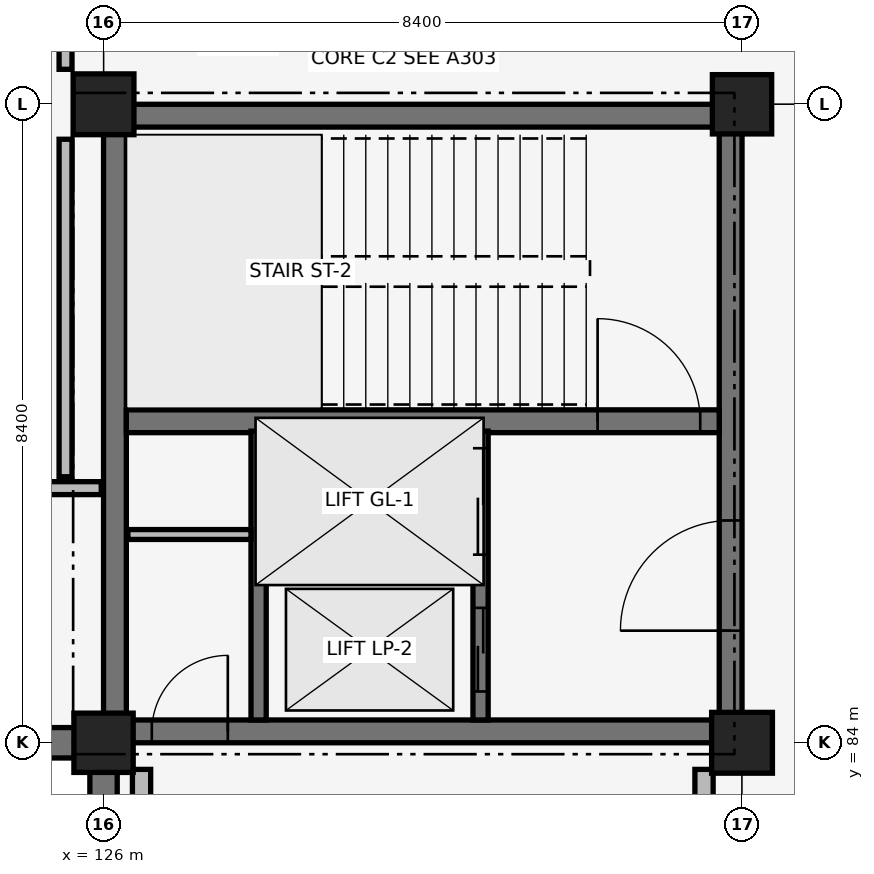
"""IFC4 building model, lengths in metres.
Left out: names, types, materials, properties, quantities, classifications, styles, units other than length and angle.
Written with IfcOpenShell. Run it as: python <this file> out.ifc"""

import sys

from ifc_helpers import new_model, si_unit, direction, frame, frame_2d, origin, origin_2d, place, context, subcontext, project, spatial, rectangle, extrude, element, fill, save


model = new_model("IFC4")
c1 = context("Model", 3, precision=1e-05, world=origin(), true_north=direction((0.0, 1.0)))
c2 = subcontext(c1, "Body", "Model", "MODEL_VIEW")
j1 = project(units=[si_unit("LENGTHUNIT", "METRE"), si_unit("PLANEANGLEUNIT", "RADIAN")], contexts=[c1])
p1 = place(None, origin())
s1 = spatial("IfcSite", under=j1, at=p1, CompositionType="ELEMENT")
p2 = place(p1, origin())
s2 = spatial("IfcBuilding", under=s1, at=p2, CompositionType="ELEMENT")
p3 = place(p2, frame((0.0, 0.0, -4.42)))
s3 = spatial("IfcBuildingStorey", under=s2, at=p3, CompositionType="ELEMENT", Elevation=-4.42)
p4 = place(p3, frame((117.95, 84.0, 0.0), z_axis=(0.0, 0.0, 1.0), x_axis=(1.0, 0.0, 0.0)))
e1 = element("IfcWall", 1, at=p4, inside=s3, PredefinedType="USERDEFINED", context=c2, shape_type="SweptSolid", body=[
    extrude(rectangle(XDim=7.7, YDim=0.4, at=frame_2d((3.85, 0.0))), origin(), (0.0, 0.0, 1.0), 4.12),
])
p5 = place(p3, frame((126.0, 75.95, 0.0), z_axis=(0.0, 0.0, 1.0), x_axis=(0.0, 1.0, 0.0)))
e2 = element("IfcWall", 2, at=p5, inside=s3, PredefinedType="USERDEFINED", context=c2, shape_type="SweptSolid", body=[
    extrude(rectangle(XDim=7.7, YDim=0.36, at=frame_2d((3.85, 0.0))), origin(), (0.0, 0.0, 1.0), 4.12),
])
p6 = place(p3, frame((126.15, 84.15, 0.0), z_axis=(0.0, 0.0, 1.0), x_axis=(1.0, 0.0, 0.0)))
e3 = element("IfcWall", 3, at=p6, inside=s3, PredefinedType="SHEAR", context=c2, shape_type="SweptSolid", body=[
    extrude(rectangle(XDim=8.1, YDim=0.3, at=frame_2d((4.05, 0.0))), origin(), (0.0, 0.0, 1.0), 4.12),
])
p7 = place(p6, frame((0.485, 0.0, 0.0)))
e4 = element("IfcOpeningElement", 4, at=p7, cuts=e3, PredefinedType="OPENING", context=c2, shape_type="SweptSolid", body=[
    extrude(rectangle(XDim=1.0, YDim=2.15, at=frame_2d((0.5, 1.075))), frame((0.0, 0.16, 0.0), z_axis=(0.0, -1.0, 0.0), x_axis=(1.0, 0.0, 0.0)), (0.0, 0.0, 1.0), 0.32),
])
for number, where, z_axis, x_axis in (
    (5, (126.15, 92.25, 0.0), (0.0, 0.0, 1.0), (1.0, 0.0, 0.0)),
    (6, (126.15, 84.15, 0.0), (0.0, 0.0, 1.0), (0.0, 1.0, 0.0)),
):
    element("IfcWall", number, at=place(p3, frame(where, z_axis=z_axis, x_axis=x_axis)), inside=s3, PredefinedType="SHEAR", context=c2, shape_type="SweptSolid", body=[
        extrude(rectangle(XDim=8.1, YDim=0.3, at=frame_2d((4.05, 0.0))), origin(), (0.0, 0.0, 1.0), 4.12),
    ])
p8 = place(p3, frame((134.25, 84.15, 0.0), z_axis=(0.0, 0.0, 1.0), x_axis=(0.0, 1.0, 0.0)))
e7 = element("IfcWall", 7, at=p8, inside=s3, PredefinedType="SHEAR", context=c2, shape_type="SweptSolid", body=[
    extrude(rectangle(XDim=8.1, YDim=0.3, at=frame_2d((4.05, 0.0))), origin(), (0.0, 0.0, 1.0), 4.12),
])
p9 = place(p8, frame((1.325, 0.0, 0.0)))
e8 = element("IfcOpeningElement", 8, at=p9, cuts=e7, PredefinedType="OPENING", context=c2, shape_type="SweptSolid", body=[
    extrude(rectangle(XDim=1.45, YDim=2.15, at=frame_2d((0.725, 1.075))), frame((0.0, 0.16, 0.0), z_axis=(0.0, -1.0, 0.0), x_axis=(1.0, 0.0, 0.0)), (0.0, 0.0, 1.0), 0.32),
])
p10 = place(p3, frame((126.3, 88.23, 0.0), z_axis=(0.0, 0.0, 1.0), x_axis=(1.0, 0.0, 0.0)))
e9 = element("IfcWall", 9, at=p10, inside=s3, PredefinedType="SHEAR", context=c2, shape_type="SweptSolid", body=[
    extrude(rectangle(XDim=7.8, YDim=0.3, at=frame_2d((3.9, 0.0))), origin(), (0.0, 0.0, 1.0), 4.12),
])
p11 = place(p10, frame((6.2, 0.0, 0.0)))
e10 = element("IfcOpeningElement", 10, at=p11, cuts=e9, PredefinedType="OPENING", context=c2, shape_type="SweptSolid", body=[
    extrude(rectangle(XDim=1.35, YDim=2.15, at=frame_2d((0.675, 1.075))), frame((0.0, 0.16, 0.0), z_axis=(0.0, -1.0, 0.0), x_axis=(1.0, 0.0, 0.0)), (0.0, 0.0, 1.0), 0.32),
])
p12 = place(p3, frame((126.0, 84.0, -0.4), z_axis=(0.0, 0.0, 1.0), x_axis=(1.0, 0.0, 0.0)))
e11 = element("IfcColumn", 11, at=p12, inside=s3, PredefinedType="COLUMN", context=c2, shape_type="SweptSolid", body=[
    extrude(rectangle(XDim=0.78, YDim=0.78, at=origin_2d()), origin(), (0.0, 0.0, 1.0), 4.52),
])
for number, where, z_axis, x_axis in (
    (12, (126.0, 92.4, -0.4), (0.0, 0.0, 1.0), (1.0, 0.0, 0.0)),
    (13, (134.4, 84.0, -0.4), (0.0, 0.0, 1.0), (1.0, 0.0, 0.0)),
):
    element("IfcColumn", number, at=place(p3, frame(where, z_axis=z_axis, x_axis=x_axis)), inside=s3, PredefinedType="COLUMN", context=c2, shape_type="SweptSolid", body=[
        extrude(rectangle(XDim=0.8, YDim=0.8, at=origin_2d()), origin(), (0.0, 0.0, 1.0), 4.52),
    ])
p13 = place(p3, frame((134.4, 92.4, -0.4), z_axis=(0.0, 0.0, 1.0), x_axis=(1.0, 0.0, 0.0)))
e14 = element("IfcColumn", 14, at=p13, inside=s3, PredefinedType="COLUMN", context=c2, shape_type="SweptSolid", body=[
    extrude(rectangle(XDim=0.78, YDim=0.78, at=origin_2d()), origin(), (0.0, 0.0, 1.0), 4.52),
])
p14 = place(p3, frame((130.96, 84.3, 0.0), z_axis=(0.0, 0.0, 1.0), x_axis=(0.0, 1.0, 0.0)))
e15 = element("IfcWall", 15, at=p14, inside=s3, PredefinedType="SHEAR", context=c2, shape_type="SweptSolid", body=[
    extrude(rectangle(XDim=3.8, YDim=0.2, at=frame_2d((1.9, 0.0))), origin(), (0.0, 0.0, 1.0), 3.17),
])
p15 = place(p14, frame((0.375, 0.0, 0.0)))
e16 = element("IfcOpeningElement", 16, at=p15, cuts=e15, PredefinedType="OPENING", context=c2, shape_type="SweptSolid", body=[
    extrude(rectangle(XDim=1.1, YDim=2.15, at=frame_2d((0.55, 1.075))), frame((0.0, 0.11, 0.0), z_axis=(0.0, -1.0, 0.0), x_axis=(1.0, 0.0, 0.0)), (0.0, 0.0, 1.0), 0.22),
])
p16 = place(p14, frame((2.175, 0.0, 0.0)))
e17 = element("IfcOpeningElement", 17, at=p16, cuts=e15, PredefinedType="OPENING", context=c2, shape_type="SweptSolid", body=[
    extrude(rectangle(XDim=1.4, YDim=2.2, at=frame_2d((0.7, 1.1))), frame((0.0, 0.11, 0.0), z_axis=(0.0, -1.0, 0.0), x_axis=(1.0, 0.0, 0.0)), (0.0, 0.0, 1.0), 0.22),
])
p17 = place(p3, frame((128.04, 84.3, 0.0), z_axis=(0.0, 0.0, 1.0), x_axis=(0.0, 1.0, 0.0)))
e18 = element("IfcWall", 18, at=p17, inside=s3, PredefinedType="SHEAR", context=c2, shape_type="SweptSolid", body=[
    extrude(rectangle(XDim=3.8, YDim=0.2, at=frame_2d((1.9, 0.0))), origin(), (0.0, 0.0, 1.0), 3.17),
])
p18 = place(p3, frame((128.15, 86.2, 0.0), z_axis=(0.0, 0.0, 1.0), x_axis=(1.0, 0.0, 0.0)))
e19 = element("IfcWall", 19, at=p18, inside=s3, PredefinedType="SHEAR", context=c2, shape_type="SweptSolid", body=[
    extrude(rectangle(XDim=2.7, YDim=0.18, at=frame_2d((1.35, 0.0))), origin(), (0.0, 0.0, 1.0), 4.12),
])
p19 = place(p3, frame((126.32, 86.74, 0.0), z_axis=(0.0, 0.0, 1.0), x_axis=(1.0, 0.0, 0.0)))
e20 = element("IfcWall", 20, at=p19, inside=s3, PredefinedType="PARTITIONING", context=c2, shape_type="SweptSolid", body=[
    extrude(rectangle(XDim=1.62, YDim=0.13, at=frame_2d((0.81, 0.0))), origin(), (0.0, 0.0, 1.0), 4.12),
])
p20 = place(p3, frame((133.9, 76.05, 0.0), z_axis=(0.0, 0.0, 1.0), x_axis=(0.0, 1.0, 0.0)))
e21 = element("IfcWall", 21, at=p20, inside=s3, PredefinedType="PARTITIONING", context=c2, shape_type="SweptSolid", body=[
    extrude(rectangle(XDim=7.6, YDim=0.24, at=frame_2d((3.8, 0.0))), origin(), (0.0, 0.0, 1.0), 3.17),
])
p21 = place(p3, frame((126.5, 76.06, 0.0), z_axis=(0.0, 0.0, 1.0), x_axis=(0.0, 1.0, 0.0)))
e22 = element("IfcWall", 22, at=p21, inside=s3, PredefinedType="PARTITIONING", context=c2, shape_type="SweptSolid", body=[
    extrude(rectangle(XDim=7.59, YDim=0.24, at=frame_2d((3.795, 0.0))), origin(), (0.0, 0.0, 1.0), 3.17),
])
p22 = place(p3, frame((109.23, 87.35, 0.0), z_axis=(0.0, 0.0, 1.0), x_axis=(1.0, 0.0, 0.0)))
e23 = element("IfcWall", 23, at=p22, inside=s3, PredefinedType="PARTITIONING", context=c2, shape_type="SweptSolid", body=[
    extrude(rectangle(XDim=16.74, YDim=0.17, at=frame_2d((8.37, 0.0))), origin(), (0.0, 0.0, 1.0), 3.32),
])
p23 = place(p22, frame((7.82, 0.0, 0.0)))
e24 = element("IfcOpeningElement", 24, at=p23, cuts=e23, PredefinedType="OPENING", context=c2, shape_type="SweptSolid", body=[
    extrude(rectangle(XDim=1.1, YDim=2.15, at=frame_2d((0.55, 1.075))), frame((0.0, 0.095, 0.0), z_axis=(0.0, -1.0, 0.0), x_axis=(1.0, 0.0, 0.0)), (0.0, 0.0, 1.0), 0.19),
])
p24 = place(p3, frame((125.5, 87.5, 0.0), z_axis=(0.0, 0.0, 1.0), x_axis=(0.0, 1.0, 0.0)))
e25 = element("IfcWall", 25, at=p24, inside=s3, PredefinedType="PARTITIONING", context=c2, shape_type="SweptSolid", body=[
    extrude(rectangle(XDim=4.44, YDim=0.17, at=frame_2d((2.22, 0.0))), origin(), (0.0, 0.0, 1.0), 3.57),
])
p25 = place(p3, frame((125.5, 92.86, 0.0), z_axis=(0.0, 0.0, 1.0), x_axis=(0.0, 1.0, 0.0)))
e26 = element("IfcWall", 26, at=p25, inside=s3, PredefinedType="PARTITIONING", context=c2, shape_type="SweptSolid", body=[
    extrude(rectangle(XDim=7.49, YDim=0.17, at=frame_2d((3.745, 0.0))), origin(), (0.0, 0.0, 1.0), 3.56),
])
p26 = place(p11, origin())
e27 = element("IfcDoor", 27, at=p26, inside=s3, OperationType="SINGLE_SWING_LEFT", PredefinedType="DOOR", context=c2, shape_type="SweptSolid", body=[
    extrude(rectangle(XDim=1.35, YDim=2.15, at=frame_2d((0.675, 1.075))), frame((0.0, 0.025, 0.0), z_axis=(0.0, -1.0, 0.0), x_axis=(1.0, 0.0, 0.0)), (0.0, 0.0, 1.0), 0.05),
])
fill(e10, e27)
p27 = place(p15, origin())
e28 = element("IfcDoor", 28, at=p27, inside=s3, OperationType="SLIDING_TO_LEFT", PredefinedType="DOOR", context=c2, shape_type="SweptSolid", body=[
    extrude(rectangle(XDim=1.1, YDim=2.15, at=frame_2d((0.55, 1.075))), frame((0.0, 0.025, 0.0), z_axis=(0.0, -1.0, 0.0), x_axis=(1.0, 0.0, 0.0)), (0.0, 0.0, 1.0), 0.05),
])
fill(e16, e28)
p28 = place(p16, origin())
e29 = element("IfcDoor", 29, at=p28, inside=s3, OperationType="SLIDING_TO_LEFT", PredefinedType="DOOR", context=c2, shape_type="SweptSolid", body=[
    extrude(rectangle(XDim=1.4, YDim=2.2, at=frame_2d((0.7, 1.1))), frame((0.0, 0.025, 0.0), z_axis=(0.0, -1.0, 0.0), x_axis=(1.0, 0.0, 0.0)), (0.0, 0.0, 1.0), 0.05),
])
fill(e17, e29)
p29 = place(p9, origin())
e30 = element("IfcDoor", 30, at=p29, inside=s3, OperationType="DOUBLE_DOOR_SINGLE_SWING", PredefinedType="DOOR", context=c2, shape_type="SweptSolid", body=[
    extrude(rectangle(XDim=1.45, YDim=2.15, at=frame_2d((0.725, 1.075))), frame((0.0, 0.025, 0.0), z_axis=(0.0, -1.0, 0.0), x_axis=(1.0, 0.0, 0.0)), (0.0, 0.0, 1.0), 0.05),
])
fill(e8, e30)
p30 = place(p7, origin())
e31 = element("IfcDoor", 31, at=p30, inside=s3, OperationType="SINGLE_SWING_RIGHT", PredefinedType="DOOR", context=c2, shape_type="SweptSolid", body=[
    extrude(rectangle(XDim=1.0, YDim=2.15, at=frame_2d((0.5, 1.075))), frame((0.0, 0.025, 0.0), z_axis=(0.0, -1.0, 0.0), x_axis=(1.0, 0.0, 0.0)), (0.0, 0.0, 1.0), 0.05),
])
fill(e4, e31)
save(model, sys.argv[1])
